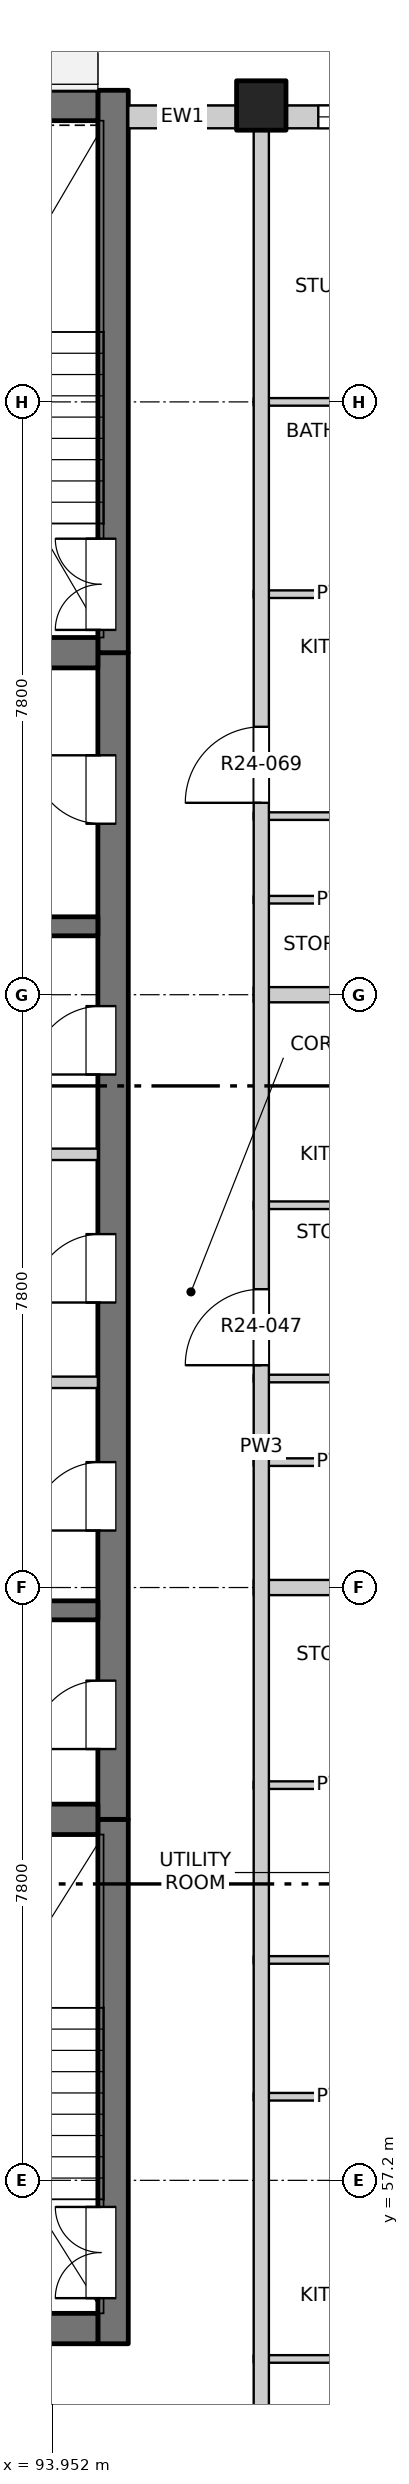
"""IFC4 building model, lengths in metres.
Left out: names, types, materials, properties, quantities, classifications, styles, units other than length and angle.
Written with IfcOpenShell. Run it as: python <this file> out.ifc"""

import sys

from ifc_helpers import new_model, si_unit, direction, frame, frame_2d, origin, origin_2d, place, context, subcontext, project, spatial, rectangle, extrude, element, fill, save


model = new_model("IFC4")
c1 = context("Model", 3, precision=1e-05, world=origin(), true_north=direction((0.0, 1.0)))
c2 = subcontext(c1, "Body", "Model", "MODEL_VIEW")
j1 = project(units=[si_unit("LENGTHUNIT", "METRE"), si_unit("PLANEANGLEUNIT", "RADIAN")], contexts=[c1])
p1 = place(None, origin())
s1 = spatial("IfcSite", under=j1, at=p1, CompositionType="ELEMENT")
p2 = place(p1, origin())
s2 = spatial("IfcBuilding", under=s1, at=p2, CompositionType="ELEMENT")
p3 = place(p2, frame((0.0, 0.0, 246.0)))
s3 = spatial("IfcBuildingStorey", under=s2, at=p3, CompositionType="ELEMENT", Elevation=246.0)
p4 = place(p3, frame((96.7, 84.5, -0.3), z_axis=(0.0, 0.0, 1.0), x_axis=(1.0, 0.0, 0.0)))
e1 = element("IfcColumn", 1, at=p4, inside=s3, PredefinedType="COLUMN", context=c2, shape_type="SweptSolid", body=[
    extrude(rectangle(XDim=0.65, YDim=0.65, at=origin_2d()), origin(), (0.0, 0.0, 1.0), 3.45),
])
p5 = place(p3, frame((94.75, 55.05, -0.3), z_axis=(0.0, 0.0, 1.0), x_axis=(0.0, 1.0, 0.0)))
e2 = element("IfcWall", 2, at=p5, inside=s3, PredefinedType="SOLIDWALL", context=c2, shape_type="SweptSolid", body=[
    extrude(rectangle(XDim=6.9, YDim=0.4, at=frame_2d((3.45, 0.0))), origin(), (0.0, 0.0, 1.0), 3.45),
])
p6 = place(p5, frame((0.6, 0.0, 0.3)))
e3 = element("IfcOpeningElement", 3, at=p6, cuts=e2, PredefinedType="OPENING", context=c2, shape_type="SweptSolid", body=[
    extrude(rectangle(XDim=1.2, YDim=2.1, at=frame_2d((0.6, 1.05))), frame((0.0, 0.21, 0.0), z_axis=(0.0, -1.0, 0.0), x_axis=(1.0, 0.0, 0.0)), (0.0, 0.0, 1.0), 0.42),
])
p7 = place(p3, frame((94.75, 61.95, -0.3), z_axis=(0.0, 0.0, 1.0), x_axis=(0.0, 1.0, 0.0)))
e4 = element("IfcWall", 4, at=p7, inside=s3, PredefinedType="SOLIDWALL", context=c2, shape_type="SweptSolid", body=[
    extrude(rectangle(XDim=15.35, YDim=0.4, at=frame_2d((7.675, 0.0))), origin(), (0.0, 0.0, 1.0), 3.45),
])
p8 = place(p7, frame((0.925, 0.0, 0.3)))
e5 = element("IfcOpeningElement", 5, at=p8, cuts=e4, PredefinedType="OPENING", context=c2, shape_type="SweptSolid", body=[
    extrude(rectangle(XDim=0.9, YDim=2.1, at=frame_2d((0.45, 1.05))), frame((0.0, 0.21, 0.0), z_axis=(0.0, -1.0, 0.0), x_axis=(1.0, 0.0, 0.0)), (0.0, 0.0, 1.0), 0.42),
])
p9 = place(p7, frame((3.8, 0.0, 0.3)))
e6 = element("IfcOpeningElement", 6, at=p9, cuts=e4, PredefinedType="OPENING", context=c2, shape_type="SweptSolid", body=[
    extrude(rectangle(XDim=0.9, YDim=2.1, at=frame_2d((0.45, 1.05))), frame((0.0, 0.21, 0.0), z_axis=(0.0, -1.0, 0.0), x_axis=(1.0, 0.0, 0.0)), (0.0, 0.0, 1.0), 0.42),
])
p10 = place(p7, frame((6.8, 0.0, 0.3)))
e7 = element("IfcOpeningElement", 7, at=p10, cuts=e4, PredefinedType="OPENING", context=c2, shape_type="SweptSolid", body=[
    extrude(rectangle(XDim=0.9, YDim=2.1, at=frame_2d((0.45, 1.05))), frame((0.0, 0.21, 0.0), z_axis=(0.0, -1.0, 0.0), x_axis=(1.0, 0.0, 0.0)), (0.0, 0.0, 1.0), 0.42),
])
p11 = place(p7, frame((9.8, 0.0, 0.3)))
e8 = element("IfcOpeningElement", 8, at=p11, cuts=e4, PredefinedType="OPENING", context=c2, shape_type="SweptSolid", body=[
    extrude(rectangle(XDim=0.9, YDim=2.1, at=frame_2d((0.45, 1.05))), frame((0.0, 0.21, 0.0), z_axis=(0.0, -1.0, 0.0), x_axis=(1.0, 0.0, 0.0)), (0.0, 0.0, 1.0), 0.42),
])
p12 = place(p7, frame((13.1, 0.0, 0.3)))
e9 = element("IfcOpeningElement", 9, at=p12, cuts=e4, PredefinedType="OPENING", context=c2, shape_type="SweptSolid", body=[
    extrude(rectangle(XDim=0.9, YDim=2.1, at=frame_2d((0.45, 1.05))), frame((0.0, 0.21, 0.0), z_axis=(0.0, -1.0, 0.0), x_axis=(1.0, 0.0, 0.0)), (0.0, 0.0, 1.0), 0.42),
])
p13 = place(p3, frame((94.75, 77.3, -0.3), z_axis=(0.0, 0.0, 1.0), x_axis=(0.0, 1.0, 0.0)))
e10 = element("IfcWall", 10, at=p13, inside=s3, PredefinedType="SOLIDWALL", context=c2, shape_type="SweptSolid", body=[
    extrude(rectangle(XDim=7.4, YDim=0.4, at=frame_2d((3.7, 0.0))), origin(), (0.0, 0.0, 1.0), 3.45),
])
p14 = place(p13, frame((0.3, 0.0, 0.3)))
e11 = element("IfcOpeningElement", 11, at=p14, cuts=e10, PredefinedType="OPENING", context=c2, shape_type="SweptSolid", body=[
    extrude(rectangle(XDim=1.2, YDim=2.1, at=frame_2d((0.6, 1.05))), frame((0.0, 0.21, 0.0), z_axis=(0.0, -1.0, 0.0), x_axis=(1.0, 0.0, 0.0)), (0.0, 0.0, 1.0), 0.42),
])
p15 = place(p3, frame((75.45, 55.25, -0.3), z_axis=(0.0, 0.0, 1.0), x_axis=(1.0, 0.0, 0.0)))
e12 = element("IfcWall", 12, at=p15, inside=s3, PredefinedType="SOLIDWALL", context=c2, shape_type="SweptSolid", body=[
    extrude(rectangle(XDim=19.1, YDim=0.4, at=frame_2d((9.55, 0.0))), origin(), (0.0, 0.0, 1.0), 3.45),
])
p16 = place(p15, frame((8.8, 0.0, 0.3)))
e13 = element("IfcOpeningElement", 13, at=p16, cuts=e12, PredefinedType="OPENING", context=c2, shape_type="SweptSolid", body=[
    extrude(rectangle(XDim=1.5, YDim=2.1, at=frame_2d((0.75, 1.05))), frame((0.0, 0.21, 0.0), z_axis=(0.0, -1.0, 0.0), x_axis=(1.0, 0.0, 0.0)), (0.0, 0.0, 1.0), 0.42),
])
p17 = place(p3, frame((75.45, 84.5, -0.3), z_axis=(0.0, 0.0, 1.0), x_axis=(1.0, 0.0, 0.0)))
e14 = element("IfcWall", 14, at=p17, inside=s3, PredefinedType="SOLIDWALL", context=c2, shape_type="SweptSolid", body=[
    extrude(rectangle(XDim=19.1, YDim=0.4, at=frame_2d((9.55, 0.0))), origin(), (0.0, 0.0, 1.0), 3.45),
])
p18 = place(p3, frame((90.675, 61.95, -0.3), z_axis=(0.0, 0.0, 1.0), x_axis=(1.0, 0.0, 0.0)))
e15 = element("IfcWall", 15, at=p18, inside=s3, PredefinedType="SOLIDWALL", context=c2, shape_type="SweptSolid", body=[
    extrude(rectangle(XDim=3.875, YDim=0.4, at=frame_2d((1.938, 0.0))), origin(), (0.0, 0.0, 1.0), 3.45),
])
for number, where, z_axis, x_axis in (
    (16, (90.675, 64.7, -0.3), (0.0, 0.0, 1.0), (1.0, 0.0, 0.0)),
    (17, (90.675, 73.7, -0.3), (0.0, 0.0, 1.0), (1.0, 0.0, 0.0)),
):
    element("IfcWall", number, at=place(p3, frame(where, z_axis=z_axis, x_axis=x_axis)), inside=s3, PredefinedType="SOLIDWALL", context=c2, shape_type="SweptSolid", body=[
        extrude(rectangle(XDim=3.875, YDim=0.25, at=frame_2d((1.938, 0.0))), origin(), (0.0, 0.0, 1.0), 3.45),
    ])
p19 = place(p3, frame((90.675, 77.3, -0.3), z_axis=(0.0, 0.0, 1.0), x_axis=(1.0, 0.0, 0.0)))
e18 = element("IfcWall", 18, at=p19, inside=s3, PredefinedType="SOLIDWALL", context=c2, shape_type="SweptSolid", body=[
    extrude(rectangle(XDim=3.875, YDim=0.4, at=frame_2d((1.938, 0.0))), origin(), (0.0, 0.0, 1.0), 3.45),
])
p20 = place(p3, frame((94.95, 84.35, 0.0), z_axis=(0.0, 0.0, 1.0), x_axis=(1.0, 0.0, 0.0)))
e19 = element("IfcWall", 19, at=p20, inside=s3, PredefinedType="SOLIDWALL", context=c2, shape_type="SweptSolid", body=[
    extrude(rectangle(XDim=1.425, YDim=0.3, at=frame_2d((0.712, 0.0))), origin(), (0.0, 0.0, 1.0), 2.7),
])
p21 = place(p3, frame((97.025, 84.35, 0.0), z_axis=(0.0, 0.0, 1.0), x_axis=(1.0, 0.0, 0.0)))
e20 = element("IfcWall", 20, at=p21, inside=s3, PredefinedType="SOLIDWALL", context=c2, shape_type="SweptSolid", body=[
    extrude(rectangle(XDim=3.575, YDim=0.3, at=frame_2d((1.788, 0.0))), origin(), (0.0, 0.0, 1.0), 2.7),
])
p22 = place(p21, frame((0.425, 0.0, 0.9)))
e21 = element("IfcOpeningElement", 21, at=p22, cuts=e20, PredefinedType="OPENING", context=c2, shape_type="SweptSolid", body=[
    extrude(rectangle(XDim=2.4, YDim=1.8, at=frame_2d((1.2, 0.9))), frame((0.0, 0.16, 0.0), z_axis=(0.0, -1.0, 0.0), x_axis=(1.0, 0.0, 0.0)), (0.0, 0.0, 1.0), 0.32),
])
for number, where, z_axis, x_axis in (
    (22, (96.6, 54.85, 0.0), (0.0, 0.0, 1.0), (1.0, 0.0, 0.0)),
    (23, (96.6, 58.3, 0.0), (0.0, 0.0, 1.0), (1.0, 0.0, 0.0)),
    (24, (96.6, 60.1, 0.0), (0.0, 0.0, 1.0), (1.0, 0.0, 0.0)),
    (25, (96.6, 62.4, 0.0), (0.0, 0.0, 1.0), (1.0, 0.0, 0.0)),
):
    element("IfcWall", number, at=place(p3, frame(where, z_axis=z_axis, x_axis=x_axis)), inside=s3, PredefinedType="PARTITIONING", context=c2, shape_type="SweptSolid", body=[
        extrude(rectangle(XDim=2.22, YDim=0.1, at=frame_2d((1.11, 0.0))), origin(), (0.0, 0.0, 1.0), 3.15),
    ])
p23 = place(p3, frame((96.6, 65.0, 0.0), z_axis=(0.0, 0.0, 1.0), x_axis=(1.0, 0.0, 0.0)))
e26 = element("IfcWall", 26, at=p23, inside=s3, PredefinedType="PARTITIONING", context=c2, shape_type="SweptSolid", body=[
    extrude(rectangle(XDim=7.6, YDim=0.2, at=frame_2d((3.8, 0.0))), origin(), (0.0, 0.0, 1.0), 3.15),
])
p24 = place(p3, frame((96.6, 66.65, 0.0), z_axis=(0.0, 0.0, 1.0), x_axis=(1.0, 0.0, 0.0)))
e27 = element("IfcWall", 27, at=p24, inside=s3, PredefinedType="PARTITIONING", context=c2, shape_type="SweptSolid", body=[
    extrude(rectangle(XDim=2.22, YDim=0.1, at=frame_2d((1.11, 0.0))), origin(), (0.0, 0.0, 1.0), 3.15),
])
p25 = place(p3, frame((90.675, 67.7, 0.0), z_axis=(0.0, 0.0, 1.0), x_axis=(1.0, 0.0, 0.0)))
e28 = element("IfcWall", 28, at=p25, inside=s3, PredefinedType="PARTITIONING", context=c2, shape_type="SweptSolid", body=[
    extrude(rectangle(XDim=3.875, YDim=0.15, at=frame_2d((1.938, 0.0))), origin(), (0.0, 0.0, 1.0), 3.15),
])
for number, where, z_axis, x_axis in (
    (29, (96.6, 67.75, 0.0), (0.0, 0.0, 1.0), (1.0, 0.0, 0.0)),
    (30, (96.6, 70.03, 0.0), (0.0, 0.0, 1.0), (1.0, 0.0, 0.0)),
):
    element("IfcWall", number, at=place(p3, frame(where, z_axis=z_axis, x_axis=x_axis)), inside=s3, PredefinedType="PARTITIONING", context=c2, shape_type="SweptSolid", body=[
        extrude(rectangle(XDim=2.22, YDim=0.1, at=frame_2d((1.11, 0.0))), origin(), (0.0, 0.0, 1.0), 3.15),
    ])
p26 = place(p3, frame((90.675, 70.7, 0.0), z_axis=(0.0, 0.0, 1.0), x_axis=(1.0, 0.0, 0.0)))
e31 = element("IfcWall", 31, at=p26, inside=s3, PredefinedType="PARTITIONING", context=c2, shape_type="SweptSolid", body=[
    extrude(rectangle(XDim=3.875, YDim=0.15, at=frame_2d((1.938, 0.0))), origin(), (0.0, 0.0, 1.0), 3.15),
])
p27 = place(p3, frame((96.6, 72.8, 0.0), z_axis=(0.0, 0.0, 1.0), x_axis=(1.0, 0.0, 0.0)))
e32 = element("IfcWall", 32, at=p27, inside=s3, PredefinedType="PARTITIONING", context=c2, shape_type="SweptSolid", body=[
    extrude(rectangle(XDim=7.6, YDim=0.2, at=frame_2d((3.8, 0.0))), origin(), (0.0, 0.0, 1.0), 3.15),
])
for number, where, z_axis, x_axis in (
    (33, (96.6, 74.05, 0.0), (0.0, 0.0, 1.0), (1.0, 0.0, 0.0)),
    (34, (96.6, 75.15, 0.0), (0.0, 0.0, 1.0), (1.0, 0.0, 0.0)),
    (35, (96.6, 78.07, 0.0), (0.0, 0.0, 1.0), (1.0, 0.0, 0.0)),
):
    element("IfcWall", number, at=place(p3, frame(where, z_axis=z_axis, x_axis=x_axis)), inside=s3, PredefinedType="PARTITIONING", context=c2, shape_type="SweptSolid", body=[
        extrude(rectangle(XDim=2.22, YDim=0.1, at=frame_2d((1.11, 0.0))), origin(), (0.0, 0.0, 1.0), 3.15),
    ])
p28 = place(p3, frame((96.6, 80.6, 0.0), z_axis=(0.0, 0.0, 1.0), x_axis=(1.0, 0.0, 0.0)))
e36 = element("IfcWall", 36, at=p28, inside=s3, PredefinedType="PARTITIONING", context=c2, shape_type="SweptSolid", body=[
    extrude(rectangle(XDim=7.6, YDim=0.1, at=frame_2d((3.8, 0.0))), origin(), (0.0, 0.0, 1.0), 3.15),
])
p29 = place(p28, frame((2.61, 0.0, 0.0)))
e37 = element("IfcOpeningElement", 37, at=p29, cuts=e36, PredefinedType="OPENING", context=c2, shape_type="SweptSolid", body=[
    extrude(rectangle(XDim=0.9, YDim=2.1, at=frame_2d((0.45, 1.05))), frame((0.0, 0.06, 0.0), z_axis=(0.0, -1.0, 0.0), x_axis=(1.0, 0.0, 0.0)), (0.0, 0.0, 1.0), 0.12),
])
p30 = place(p3, frame((96.7, 49.5, 0.0), z_axis=(0.0, 0.0, 1.0), x_axis=(0.0, 1.0, 0.0)))
e38 = element("IfcWall", 38, at=p30, inside=s3, PredefinedType="PARTITIONING", context=c2, shape_type="SweptSolid", body=[
    extrude(rectangle(XDim=34.7, YDim=0.2, at=frame_2d((17.35, 0.0))), origin(), (0.0, 0.0, 1.0), 3.15),
])
p31 = place(p30, frame((3.075, 0.0, 0.0)))
e39 = element("IfcOpeningElement", 39, at=p31, cuts=e38, PredefinedType="OPENING", context=c2, shape_type="SweptSolid", body=[
    extrude(rectangle(XDim=1.0, YDim=2.1, at=frame_2d((0.5, 1.05))), frame((0.0, 0.11, 0.0), z_axis=(0.0, -1.0, 0.0), x_axis=(1.0, 0.0, 0.0)), (0.0, 0.0, 1.0), 0.22),
])
p32 = place(p30, frame((18.425, 0.0, 0.0)))
e40 = element("IfcOpeningElement", 40, at=p32, cuts=e38, PredefinedType="OPENING", context=c2, shape_type="SweptSolid", body=[
    extrude(rectangle(XDim=1.0, YDim=2.1, at=frame_2d((0.5, 1.05))), frame((0.0, 0.11, 0.0), z_axis=(0.0, -1.0, 0.0), x_axis=(1.0, 0.0, 0.0)), (0.0, 0.0, 1.0), 0.22),
])
p33 = place(p30, frame((25.825, 0.0, 0.0)))
e41 = element("IfcOpeningElement", 41, at=p33, cuts=e38, PredefinedType="OPENING", context=c2, shape_type="SweptSolid", body=[
    extrude(rectangle(XDim=1.0, YDim=2.1, at=frame_2d((0.5, 1.05))), frame((0.0, 0.11, 0.0), z_axis=(0.0, -1.0, 0.0), x_axis=(1.0, 0.0, 0.0)), (0.0, 0.0, 1.0), 0.22),
])
p34 = place(p22, origin())
e42 = element("IfcWindow", 42, at=p34, inside=s3, PartitioningType="DOUBLE_PANEL_VERTICAL", PredefinedType="WINDOW", context=c2, shape_type="SweptSolid", body=[
    extrude(rectangle(XDim=2.4, YDim=1.8, at=frame_2d((1.2, 0.9))), frame((0.0, 0.03, 0.0), z_axis=(0.0, -1.0, 0.0), x_axis=(1.0, 0.0, 0.0)), (0.0, 0.0, 1.0), 0.06),
])
fill(e21, e42)
p35 = place(p6, origin())
e43 = element("IfcDoor", 43, at=p35, inside=s3, OperationType="DOUBLE_DOOR_SINGLE_SWING", PredefinedType="DOOR", context=c2, shape_type="SweptSolid", body=[
    extrude(rectangle(XDim=1.2, YDim=2.1, at=frame_2d((0.6, 1.05))), frame((0.0, 0.185, 0.0), z_axis=(0.0, -1.0, 0.0), x_axis=(1.0, 0.0, 0.0)), (0.0, 0.0, 1.0), 0.05),
])
fill(e3, e43)
p36 = place(p8, origin())
e44 = element("IfcDoor", 44, at=p36, inside=s3, OperationType="SINGLE_SWING_LEFT", PredefinedType="DOOR", context=c2, shape_type="SweptSolid", body=[
    extrude(rectangle(XDim=0.9, YDim=2.1, at=frame_2d((0.45, 1.05))), frame((0.0, 0.185, 0.0), z_axis=(0.0, -1.0, 0.0), x_axis=(1.0, 0.0, 0.0)), (0.0, 0.0, 1.0), 0.05),
])
fill(e5, e44)
p37 = place(p9, origin())
e45 = element("IfcDoor", 45, at=p37, inside=s3, OperationType="SINGLE_SWING_LEFT", PredefinedType="DOOR", context=c2, shape_type="SweptSolid", body=[
    extrude(rectangle(XDim=0.9, YDim=2.1, at=frame_2d((0.45, 1.05))), frame((0.0, 0.185, 0.0), z_axis=(0.0, -1.0, 0.0), x_axis=(1.0, 0.0, 0.0)), (0.0, 0.0, 1.0), 0.05),
])
fill(e6, e45)
p38 = place(p32, origin())
e46 = element("IfcDoor", 46, at=p38, inside=s3, OperationType="SINGLE_SWING_LEFT", PredefinedType="DOOR", context=c2, shape_type="SweptSolid", body=[
    extrude(rectangle(XDim=1.0, YDim=2.1, at=frame_2d((0.5, 1.05))), frame((0.0, 0.025, 0.0), z_axis=(0.0, -1.0, 0.0), x_axis=(1.0, 0.0, 0.0)), (0.0, 0.0, 1.0), 0.05),
])
fill(e40, e46)
p39 = place(p10, origin())
e47 = element("IfcDoor", 47, at=p39, inside=s3, OperationType="SINGLE_SWING_LEFT", PredefinedType="DOOR", context=c2, shape_type="SweptSolid", body=[
    extrude(rectangle(XDim=0.9, YDim=2.1, at=frame_2d((0.45, 1.05))), frame((0.0, 0.185, 0.0), z_axis=(0.0, -1.0, 0.0), x_axis=(1.0, 0.0, 0.0)), (0.0, 0.0, 1.0), 0.05),
])
fill(e7, e47)
p40 = place(p11, origin())
e48 = element("IfcDoor", 48, at=p40, inside=s3, OperationType="SINGLE_SWING_LEFT", PredefinedType="DOOR", context=c2, shape_type="SweptSolid", body=[
    extrude(rectangle(XDim=0.9, YDim=2.1, at=frame_2d((0.45, 1.05))), frame((0.0, 0.185, 0.0), z_axis=(0.0, -1.0, 0.0), x_axis=(1.0, 0.0, 0.0)), (0.0, 0.0, 1.0), 0.05),
])
fill(e8, e48)
p41 = place(p12, origin())
e49 = element("IfcDoor", 49, at=p41, inside=s3, OperationType="SINGLE_SWING_RIGHT", PredefinedType="DOOR", context=c2, shape_type="SweptSolid", body=[
    extrude(rectangle(XDim=0.9, YDim=2.1, at=frame_2d((0.45, 1.05))), frame((0.0, 0.185, 0.0), z_axis=(0.0, -1.0, 0.0), x_axis=(1.0, 0.0, 0.0)), (0.0, 0.0, 1.0), 0.05),
])
fill(e9, e49)
p42 = place(p33, origin())
e50 = element("IfcDoor", 50, at=p42, inside=s3, OperationType="SINGLE_SWING_LEFT", PredefinedType="DOOR", context=c2, shape_type="SweptSolid", body=[
    extrude(rectangle(XDim=1.0, YDim=2.1, at=frame_2d((0.5, 1.05))), frame((0.0, 0.025, 0.0), z_axis=(0.0, -1.0, 0.0), x_axis=(1.0, 0.0, 0.0)), (0.0, 0.0, 1.0), 0.05),
])
fill(e41, e50)
p43 = place(p14, origin())
e51 = element("IfcDoor", 51, at=p43, inside=s3, OperationType="DOUBLE_DOOR_SINGLE_SWING", PredefinedType="DOOR", context=c2, shape_type="SweptSolid", body=[
    extrude(rectangle(XDim=1.2, YDim=2.1, at=frame_2d((0.6, 1.05))), frame((0.0, 0.185, 0.0), z_axis=(0.0, -1.0, 0.0), x_axis=(1.0, 0.0, 0.0)), (0.0, 0.0, 1.0), 0.05),
])
fill(e11, e51)
save(model, sys.argv[1])
